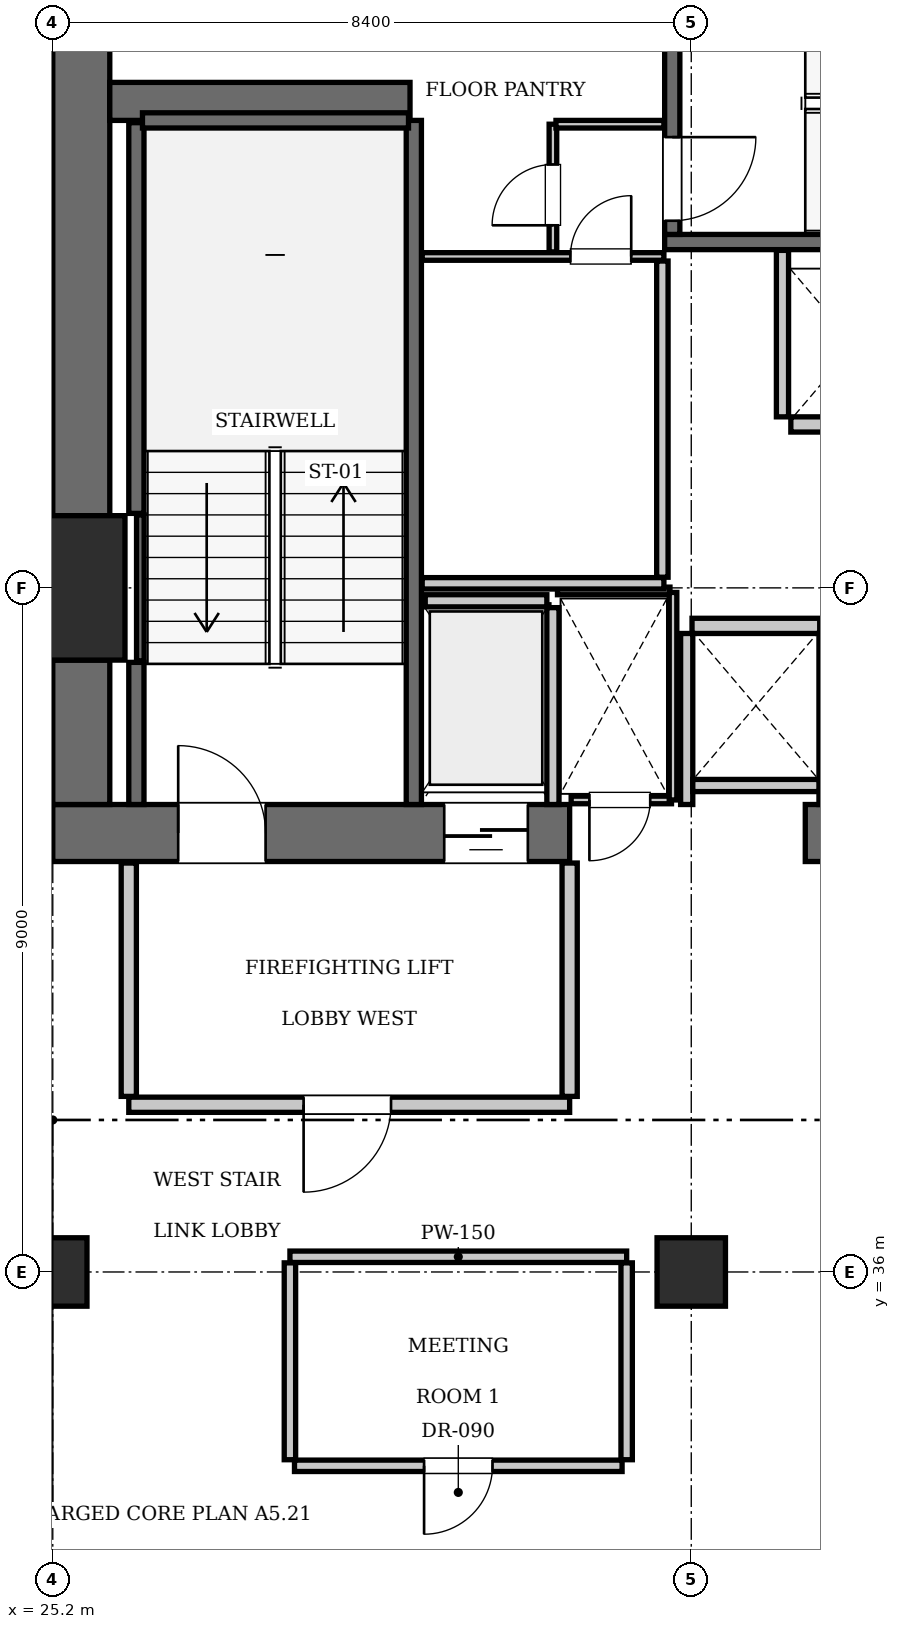
"""IFC4 building model, lengths in metres.
Left out: names, types, materials, properties, quantities, classifications, styles, units other than length and angle.
Written with IfcOpenShell. Run it as: python <this file> out.ifc"""

import sys

from ifc_helpers import new_model, si_unit, direction, frame, frame_2d, origin, origin_2d, place, context, subcontext, project, spatial, rectangle, extrude, element, fill, save


model = new_model("IFC4")
c1 = context("Model", 3, precision=1e-05, world=origin(), true_north=direction((0.0, 1.0)))
c2 = subcontext(c1, "Body", "Model", "MODEL_VIEW")
j1 = project(units=[si_unit("LENGTHUNIT", "METRE"), si_unit("PLANEANGLEUNIT", "RADIAN")], contexts=[c1])
p1 = place(None, origin())
s1 = spatial("IfcSite", under=j1, at=p1, CompositionType="ELEMENT")
p2 = place(p1, origin())
s2 = spatial("IfcBuilding", under=s1, at=p2, CompositionType="ELEMENT")
p3 = place(p2, frame((0.0, 0.0, 177.45)))
s3 = spatial("IfcBuildingStorey", under=s2, at=p3, CompositionType="ELEMENT", Elevation=177.45)
p4 = place(p3, frame((25.2, 45.0, 0.0), z_axis=(0.0, 0.0, 1.0), x_axis=(1.0, 0.0, 0.0)))
e1 = element("IfcColumn", 1, at=p4, inside=s3, PredefinedType="COLUMN", context=c2, shape_type="SweptSolid", body=[
    extrude(rectangle(XDim=1.9, YDim=1.9, at=origin_2d()), origin(), (0.0, 0.0, 1.0), 3.85),
])
p5 = place(p3, frame((25.2, 41.775, 0.0), z_axis=(0.0, 0.0, 1.0), x_axis=(1.0, 0.0, 0.0)))
e2 = element("IfcWall", 2, at=p5, inside=s3, PredefinedType="SHEAR", context=c2, shape_type="SweptSolid", body=[
    extrude(rectangle(XDim=6.8, YDim=0.75, at=frame_2d((3.4, 0.0))), origin(), (0.0, 0.0, 1.0), 3.85),
])
p6 = place(p5, frame((1.65, 0.0, 0.0)))
e3 = element("IfcOpeningElement", 3, at=p6, cuts=e2, PredefinedType="OPENING", context=c2, shape_type="SweptSolid", body=[
    extrude(rectangle(XDim=1.15, YDim=2.15, at=frame_2d((0.575, 1.075))), frame((0.0, 0.385, 0.0), z_axis=(0.0, -1.0, 0.0), x_axis=(1.0, 0.0, 0.0)), (0.0, 0.0, 1.0), 0.77),
])
p7 = place(p5, frame((5.15, 0.0, 0.0)))
e4 = element("IfcOpeningElement", 4, at=p7, cuts=e2, PredefinedType="OPENING", context=c2, shape_type="SweptSolid", body=[
    extrude(rectangle(XDim=1.1, YDim=2.2, at=frame_2d((0.55, 1.1))), frame((0.0, 0.385, 0.0), z_axis=(0.0, -1.0, 0.0), x_axis=(1.0, 0.0, 0.0)), (0.0, 0.0, 1.0), 0.77),
])
p8 = place(p3, frame((35.1, 41.775, 0.0), z_axis=(0.0, 0.0, 1.0), x_axis=(1.0, 0.0, 0.0)))
e5 = element("IfcWall", 5, at=p8, inside=s3, PredefinedType="SHEAR", context=c2, shape_type="SweptSolid", body=[
    extrude(rectangle(XDim=5.4, YDim=0.75, at=frame_2d((2.7, 0.0))), origin(), (0.0, 0.0, 1.0), 3.85),
])
p9 = place(p3, frame((25.575, 42.15, 0.0), z_axis=(0.0, 0.0, 1.0), x_axis=(0.0, 1.0, 0.0)))
e6 = element("IfcWall", 6, at=p9, inside=s3, PredefinedType="SHEAR", context=c2, shape_type="SweptSolid", body=[
    extrude(rectangle(XDim=1.9, YDim=0.75, at=frame_2d((0.95, 0.0))), origin(), (0.0, 0.0, 1.0), 3.85),
])
p10 = place(p3, frame((25.575, 45.95, 0.0), z_axis=(0.0, 0.0, 1.0), x_axis=(0.0, 1.0, 0.0)))
e7 = element("IfcWall", 7, at=p10, inside=s3, PredefinedType="SHEAR", context=c2, shape_type="SweptSolid", body=[
    extrude(rectangle(XDim=7.3, YDim=0.75, at=frame_2d((3.65, 0.0))), origin(), (0.0, 0.0, 1.0), 3.85),
])
p11 = place(p3, frame((25.95, 51.4, 0.0), z_axis=(0.0, 0.0, 1.0), x_axis=(1.0, 0.0, 0.0)))
e8 = element("IfcWall", 8, at=p11, inside=s3, PredefinedType="SHEAR", context=c2, shape_type="SweptSolid", body=[
    extrude(rectangle(XDim=3.95, YDim=0.5, at=frame_2d((1.975, 0.0))), origin(), (0.0, 0.0, 1.0), 3.85),
])
for number, where, z_axis, x_axis in (
    (9, (25.2, 36.0, 0.0), (0.0, 0.0, 1.0), (1.0, 0.0, 0.0)),
    (10, (33.6, 36.0, 0.0), (0.0, 0.0, 1.0), (1.0, 0.0, 0.0)),
):
    element("IfcColumn", number, at=place(p3, frame(where, z_axis=z_axis, x_axis=x_axis)), inside=s3, PredefinedType="COLUMN", context=c2, shape_type="SweptSolid", body=[
        extrude(rectangle(XDim=0.9, YDim=0.9, at=origin_2d()), origin(), (0.0, 0.0, 1.0), 3.85),
    ])
p12 = place(p3, frame((29.95, 42.15, 0.0), z_axis=(0.0, 0.0, 1.0), x_axis=(0.0, 1.0, 0.0)))
e11 = element("IfcWall", 11, at=p12, inside=s3, PredefinedType="SOLIDWALL", context=c2, shape_type="SweptSolid", body=[
    extrude(rectangle(XDim=9.0, YDim=0.2, at=frame_2d((4.5, 0.0))), origin(), (0.0, 0.0, 1.0), 3.61),
])
p13 = place(p3, frame((26.3, 42.15, 0.0), z_axis=(0.0, 0.0, 1.0), x_axis=(0.0, 1.0, 0.0)))
e12 = element("IfcWall", 12, at=p13, inside=s3, PredefinedType="SOLIDWALL", context=c2, shape_type="SweptSolid", body=[
    extrude(rectangle(XDim=1.87, YDim=0.2, at=frame_2d((0.935, 0.0))), origin(), (0.0, 0.0, 1.0), 3.61),
])
p14 = place(p3, frame((26.3, 45.98, 0.0), z_axis=(0.0, 0.0, 1.0), x_axis=(0.0, 1.0, 0.0)))
e13 = element("IfcWall", 13, at=p14, inside=s3, PredefinedType="SOLIDWALL", context=c2, shape_type="SweptSolid", body=[
    extrude(rectangle(XDim=5.14, YDim=0.2, at=frame_2d((2.57, 0.0))), origin(), (0.0, 0.0, 1.0), 3.61),
])
p15 = place(p3, frame((26.38, 51.15, 0.0), z_axis=(0.0, 0.0, 1.0), x_axis=(1.0, 0.0, 0.0)))
e14 = element("IfcWall", 14, at=p15, inside=s3, PredefinedType="SOLIDWALL", context=c2, shape_type="SweptSolid", body=[
    extrude(rectangle(XDim=3.5, YDim=0.2, at=frame_2d((1.75, 0.0))), origin(), (0.0, 0.0, 1.0), 3.61),
])
p16 = place(p3, frame((26.352, 44.04, 0.0), z_axis=(0.0, 0.0, 1.0), x_axis=(0.0, 1.0, 0.0)))
e15 = element("IfcWall", 15, at=p16, inside=s3, PredefinedType="SOLIDWALL", context=c2, shape_type="SweptSolid", body=[
    extrude(rectangle(XDim=1.92, YDim=0.1, at=frame_2d((0.96, 0.0))), origin(), (0.0, 0.0, 1.0), 3.61),
])
p17 = place(p3, frame((33.25, 49.55, 0.0), z_axis=(0.0, 0.0, 1.0), x_axis=(1.0, 0.0, 0.0)))
e16 = element("IfcWall", 16, at=p17, inside=s3, PredefinedType="SOLIDWALL", context=c2, shape_type="SweptSolid", body=[
    extrude(rectangle(XDim=9.1, YDim=0.2, at=frame_2d((4.55, 0.0))), origin(), (0.0, 0.0, 1.0), 3.61),
])
p18 = place(p3, frame((33.35, 49.65, 0.0), z_axis=(0.0, 0.0, 1.0), x_axis=(0.0, 1.0, 0.0)))
e17 = element("IfcWall", 17, at=p18, inside=s3, PredefinedType="SOLIDWALL", context=c2, shape_type="SweptSolid", body=[
    extrude(rectangle(XDim=3.6, YDim=0.2, at=frame_2d((1.8, 0.0))), origin(), (0.0, 0.0, 1.0), 3.61),
])
p19 = place(p18, frame((0.18, 0.0, 0.0)))
e18 = element("IfcOpeningElement", 18, at=p19, cuts=e17, PredefinedType="OPENING", context=c2, shape_type="SweptSolid", body=[
    extrude(rectangle(XDim=1.1, YDim=2.15, at=frame_2d((0.55, 1.075))), frame((0.0, 0.11, 0.0), z_axis=(0.0, -1.0, 0.0), x_axis=(1.0, 0.0, 0.0)), (0.0, 0.0, 1.0), 0.22),
])
p20 = place(p3, frame((34.91, 47.15, 0.0), z_axis=(0.0, 0.0, 1.0), x_axis=(1.0, 0.0, 0.0)))
e19 = element("IfcWall", 19, at=p20, inside=s3, PredefinedType="SOLIDWALL", context=c2, shape_type="SweptSolid", body=[
    extrude(rectangle(XDim=1.68, YDim=0.2, at=frame_2d((0.84, 0.0))), origin(), (0.0, 0.0, 1.0), 3.61),
])
p21 = place(p3, frame((33.61, 44.5, 0.0), z_axis=(0.0, 0.0, 1.0), x_axis=(1.0, 0.0, 0.0)))
e20 = element("IfcWall", 20, at=p21, inside=s3, PredefinedType="SOLIDWALL", context=c2, shape_type="SweptSolid", body=[
    extrude(rectangle(XDim=1.68, YDim=0.2, at=frame_2d((0.84, 0.0))), origin(), (0.0, 0.0, 1.0), 3.61),
])
p22 = place(p3, frame((30.1, 44.83, 0.0), z_axis=(0.0, 0.0, 1.0), x_axis=(1.0, 0.0, 0.0)))
e21 = element("IfcWall", 21, at=p22, inside=s3, PredefinedType="SOLIDWALL", context=c2, shape_type="SweptSolid", body=[
    extrude(rectangle(XDim=1.6, YDim=0.16, at=frame_2d((0.8, 0.0))), origin(), (0.0, 0.0, 1.0), 3.61),
])
p23 = place(p3, frame((31.78, 42.15, 0.0), z_axis=(0.0, 0.0, 1.0), x_axis=(0.0, 1.0, 0.0)))
e22 = element("IfcWall", 22, at=p23, inside=s3, PredefinedType="SOLIDWALL", context=c2, shape_type="SweptSolid", body=[
    extrude(rectangle(XDim=2.59, YDim=0.16, at=frame_2d((1.295, 0.0))), origin(), (0.0, 0.0, 1.0), 3.61),
])
p24 = place(p3, frame((34.8, 47.25, 0.0), z_axis=(0.0, 0.0, 1.0), x_axis=(0.0, 1.0, 0.0)))
e23 = element("IfcWall", 23, at=p24, inside=s3, PredefinedType="SOLIDWALL", context=c2, shape_type="SweptSolid", body=[
    extrude(rectangle(XDim=2.19, YDim=0.16, at=frame_2d((1.095, 0.0))), origin(), (0.0, 0.0, 1.0), 3.61),
])
for number, where, z_axis, x_axis in (
    (24, (33.54, 42.15, 0.0), (0.0, 0.0, 1.0), (0.0, 1.0, 0.0)),
    (25, (35.36, 42.15, 0.0), (0.0, 0.0, 1.0), (0.0, 1.0, 0.0)),
):
    element("IfcWall", number, at=place(p3, frame(where, z_axis=z_axis, x_axis=x_axis)), inside=s3, PredefinedType="SOLIDWALL", context=c2, shape_type="SweptSolid", body=[
        extrude(rectangle(XDim=2.25, YDim=0.16, at=frame_2d((1.125, 0.0))), origin(), (0.0, 0.0, 1.0), 3.61),
    ])
p25 = place(p3, frame((33.62, 42.4, 0.0), z_axis=(0.0, 0.0, 1.0), x_axis=(1.0, 0.0, 0.0)))
e26 = element("IfcWall", 26, at=p25, inside=s3, PredefinedType="SOLIDWALL", context=c2, shape_type="SweptSolid", body=[
    extrude(rectangle(XDim=1.66, YDim=0.16, at=frame_2d((0.83, 0.0))), origin(), (0.0, 0.0, 1.0), 3.61),
])
p26 = place(p3, frame((26.2, 38.2, 0.0), z_axis=(0.0, 0.0, 1.0), x_axis=(1.0, 0.0, 0.0)))
e27 = element("IfcWall", 27, at=p26, inside=s3, PredefinedType="PARTITIONING", context=c2, shape_type="SweptSolid", body=[
    extrude(rectangle(XDim=5.8, YDim=0.2, at=frame_2d((2.9, 0.0))), origin(), (0.0, 0.0, 1.0), 3.61),
])
p27 = place(p26, frame((2.3, 0.0, 0.0)))
e28 = element("IfcOpeningElement", 28, at=p27, cuts=e27, PredefinedType="OPENING", context=c2, shape_type="SweptSolid", body=[
    extrude(rectangle(XDim=1.15, YDim=2.15, at=frame_2d((0.575, 1.075))), frame((0.0, 0.11, 0.0), z_axis=(0.0, -1.0, 0.0), x_axis=(1.0, 0.0, 0.0)), (0.0, 0.0, 1.0), 0.22),
])
for number, where, z_axis, x_axis in (
    (29, (26.2, 38.31, 0.0), (0.0, 0.0, 1.0), (0.0, 1.0, 0.0)),
    (30, (32.0, 38.31, 0.0), (0.0, 0.0, 1.0), (0.0, 1.0, 0.0)),
):
    element("IfcWall", number, at=place(p3, frame(where, z_axis=z_axis, x_axis=x_axis)), inside=s3, PredefinedType="PARTITIONING", context=c2, shape_type="SweptSolid", body=[
        extrude(rectangle(XDim=3.07, YDim=0.2, at=frame_2d((1.535, 0.0))), origin(), (0.0, 0.0, 1.0), 3.61),
    ])
p28 = place(p3, frame((32.02, 42.21, 0.0), z_axis=(0.0, 0.0, 1.0), x_axis=(1.0, 0.0, 0.0)))
e31 = element("IfcWall", 31, at=p28, inside=s3, PredefinedType="PARTITIONING", context=c2, shape_type="SweptSolid", body=[
    extrude(rectangle(XDim=1.32, YDim=0.1, at=frame_2d((0.66, 0.0))), origin(), (0.0, 0.0, 1.0), 3.61),
])
p29 = place(p28, frame((0.24, 0.0, 0.0)))
e32 = element("IfcOpeningElement", 32, at=p29, cuts=e31, PredefinedType="OPENING", context=c2, shape_type="SweptSolid", body=[
    extrude(rectangle(XDim=0.8, YDim=2.05, at=frame_2d((0.4, 1.025))), frame((0.0, 0.06, 0.0), z_axis=(0.0, -1.0, 0.0), x_axis=(1.0, 0.0, 0.0)), (0.0, 0.0, 1.0), 0.12),
])
p30 = place(p3, frame((31.84, 44.96, 0.0), z_axis=(0.0, 0.0, 1.0), x_axis=(1.0, 0.0, 0.0)))
e33 = element("IfcWall", 33, at=p30, inside=s3, PredefinedType="PARTITIONING", context=c2, shape_type="SweptSolid", body=[
    extrude(rectangle(XDim=1.48, YDim=0.1, at=frame_2d((0.74, 0.0))), origin(), (0.0, 0.0, 1.0), 3.61),
])
p31 = place(p3, frame((33.36, 42.21, 0.0), z_axis=(0.0, 0.0, 1.0), x_axis=(0.0, 1.0, 0.0)))
e34 = element("IfcWall", 34, at=p31, inside=s3, PredefinedType="PARTITIONING", context=c2, shape_type="SweptSolid", body=[
    extrude(rectangle(XDim=2.73, YDim=0.1, at=frame_2d((1.365, 0.0))), origin(), (0.0, 0.0, 1.0), 3.61),
])
p32 = place(p3, frame((30.06, 45.06, 0.0), z_axis=(0.0, 0.0, 1.0), x_axis=(1.0, 0.0, 0.0)))
e35 = element("IfcWall", 35, at=p32, inside=s3, PredefinedType="PARTITIONING", context=c2, shape_type="SweptSolid", body=[
    extrude(rectangle(XDim=3.18, YDim=0.15, at=frame_2d((1.59, 0.0))), origin(), (0.0, 0.0, 1.0), 3.61),
])
p33 = place(p3, frame((33.22, 45.14, 0.0), z_axis=(0.0, 0.0, 1.0), x_axis=(0.0, 1.0, 0.0)))
e36 = element("IfcWall", 36, at=p33, inside=s3, PredefinedType="PARTITIONING", context=c2, shape_type="SweptSolid", body=[
    extrude(rectangle(XDim=4.16, YDim=0.15, at=frame_2d((2.08, 0.0))), origin(), (0.0, 0.0, 1.0), 3.61),
])
p34 = place(p3, frame((30.06, 49.36, 0.0), z_axis=(0.0, 0.0, 1.0), x_axis=(1.0, 0.0, 0.0)))
e37 = element("IfcWall", 37, at=p34, inside=s3, PredefinedType="PARTITIONING", context=c2, shape_type="SweptSolid", body=[
    extrude(rectangle(XDim=3.18, YDim=0.1, at=frame_2d((1.59, 0.0))), origin(), (0.0, 0.0, 1.0), 3.61),
])
p35 = place(p34, frame((1.95, 0.0, 0.0)))
e38 = element("IfcOpeningElement", 38, at=p35, cuts=e37, PredefinedType="OPENING", context=c2, shape_type="SweptSolid", body=[
    extrude(rectangle(XDim=0.8, YDim=2.05, at=frame_2d((0.4, 1.025))), frame((0.0, 0.06, 0.0), z_axis=(0.0, -1.0, 0.0), x_axis=(1.0, 0.0, 0.0)), (0.0, 0.0, 1.0), 0.12),
])
p36 = place(p3, frame((31.78, 49.42, 0.0), z_axis=(0.0, 0.0, 1.0), x_axis=(0.0, 1.0, 0.0)))
e39 = element("IfcWall", 39, at=p36, inside=s3, PredefinedType="PARTITIONING", context=c2, shape_type="SweptSolid", body=[
    extrude(rectangle(XDim=1.68, YDim=0.1, at=frame_2d((0.84, 0.0))), origin(), (0.0, 0.0, 1.0), 3.61),
])
p37 = place(p36, frame((0.35, 0.0, 0.0)))
e40 = element("IfcOpeningElement", 40, at=p37, cuts=e39, PredefinedType="OPENING", context=c2, shape_type="SweptSolid", body=[
    extrude(rectangle(XDim=0.8, YDim=2.05, at=frame_2d((0.4, 1.025))), frame((0.0, 0.06, 0.0), z_axis=(0.0, -1.0, 0.0), x_axis=(1.0, 0.0, 0.0)), (0.0, 0.0, 1.0), 0.12),
])
p38 = place(p3, frame((31.82, 51.1, 0.0), z_axis=(0.0, 0.0, 1.0), x_axis=(1.0, 0.0, 0.0)))
e41 = element("IfcWall", 41, at=p38, inside=s3, PredefinedType="PARTITIONING", context=c2, shape_type="SweptSolid", body=[
    extrude(rectangle(XDim=1.42, YDim=0.1, at=frame_2d((0.71, 0.0))), origin(), (0.0, 0.0, 1.0), 3.61),
])
p39 = place(p3, frame((28.32, 36.2, 0.0), z_axis=(0.0, 0.0, 1.0), x_axis=(1.0, 0.0, 0.0)))
e42 = element("IfcWall", 42, at=p39, inside=s3, PredefinedType="PARTITIONING", context=c2, shape_type="SweptSolid", body=[
    extrude(rectangle(XDim=4.43, YDim=0.15, at=frame_2d((2.215, 0.0))), origin(), (0.0, 0.0, 1.0), 3.61),
])
for number, where, z_axis, x_axis in (
    (43, (28.32, 33.53, 0.0), (0.0, 0.0, 1.0), (0.0, 1.0, 0.0)),
    (44, (32.75, 33.53, 0.0), (0.0, 0.0, 1.0), (0.0, 1.0, 0.0)),
):
    element("IfcWall", number, at=place(p3, frame(where, z_axis=z_axis, x_axis=x_axis)), inside=s3, PredefinedType="PARTITIONING", context=c2, shape_type="SweptSolid", body=[
        extrude(rectangle(XDim=2.59, YDim=0.15, at=frame_2d((1.295, 0.0))), origin(), (0.0, 0.0, 1.0), 3.61),
    ])
p40 = place(p3, frame((28.38, 33.45, 0.0), z_axis=(0.0, 0.0, 1.0), x_axis=(1.0, 0.0, 0.0)))
e45 = element("IfcWall", 45, at=p40, inside=s3, PredefinedType="PARTITIONING", context=c2, shape_type="SweptSolid", body=[
    extrude(rectangle(XDim=4.31, YDim=0.15, at=frame_2d((2.155, 0.0))), origin(), (0.0, 0.0, 1.0), 3.61),
])
p41 = place(p40, frame((1.705, 0.0, 0.0)))
e46 = element("IfcOpeningElement", 46, at=p41, cuts=e45, PredefinedType="OPENING", context=c2, shape_type="SweptSolid", body=[
    extrude(rectangle(XDim=0.9, YDim=2.1, at=frame_2d((0.45, 1.05))), frame((0.0, 0.085, 0.0), z_axis=(0.0, -1.0, 0.0), x_axis=(1.0, 0.0, 0.0)), (0.0, 0.0, 1.0), 0.17),
])
p42 = place(p6, origin())
e47 = element("IfcDoor", 47, at=p42, inside=s3, OperationType="SINGLE_SWING_LEFT", PredefinedType="DOOR", context=c2, shape_type="SweptSolid", body=[
    extrude(rectangle(XDim=1.15, YDim=2.15, at=frame_2d((0.575, 1.075))), frame((0.0, 0.025, 0.0), z_axis=(0.0, -1.0, 0.0), x_axis=(1.0, 0.0, 0.0)), (0.0, 0.0, 1.0), 0.05),
])
fill(e3, e47)
p43 = place(p19, frame((1.1, 0.0, 0.0), z_axis=(0.0, 0.0, 1.0), x_axis=(-1.0, 0.0, 0.0)))
e48 = element("IfcDoor", 48, at=p43, inside=s3, OperationType="SINGLE_SWING_LEFT", PredefinedType="DOOR", context=c2, shape_type="SweptSolid", body=[
    extrude(rectangle(XDim=1.1, YDim=2.15, at=frame_2d((0.55, 1.075))), frame((0.0, 0.025, 0.0), z_axis=(0.0, -1.0, 0.0), x_axis=(1.0, 0.0, 0.0)), (0.0, 0.0, 1.0), 0.05),
])
fill(e18, e48)
p44 = place(p7, frame((1.1, 0.0, 0.0), z_axis=(0.0, 0.0, 1.0), x_axis=(-1.0, 0.0, 0.0)))
e49 = element("IfcDoor", 49, at=p44, inside=s3, OperationType="SLIDING_TO_LEFT", PredefinedType="DOOR", context=c2, shape_type="SweptSolid", body=[
    extrude(rectangle(XDim=1.1, YDim=2.2, at=frame_2d((0.55, 1.1))), frame((0.0, 0.025, 0.0), z_axis=(0.0, -1.0, 0.0), x_axis=(1.0, 0.0, 0.0)), (0.0, 0.0, 1.0), 0.05),
])
fill(e4, e49)
p45 = place(p27, frame((1.15, 0.0, 0.0), z_axis=(0.0, 0.0, 1.0), x_axis=(-1.0, 0.0, 0.0)))
e50 = element("IfcDoor", 50, at=p45, inside=s3, OperationType="SINGLE_SWING_RIGHT", PredefinedType="DOOR", context=c2, shape_type="SweptSolid", body=[
    extrude(rectangle(XDim=1.15, YDim=2.15, at=frame_2d((0.575, 1.075))), frame((0.0, 0.025, 0.0), z_axis=(0.0, -1.0, 0.0), x_axis=(1.0, 0.0, 0.0)), (0.0, 0.0, 1.0), 0.05),
])
fill(e28, e50)
p46 = place(p29, frame((0.8, 0.0, 0.0), z_axis=(0.0, 0.0, 1.0), x_axis=(-1.0, 0.0, 0.0)))
e51 = element("IfcDoor", 51, at=p46, inside=s3, OperationType="SINGLE_SWING_RIGHT", PredefinedType="DOOR", context=c2, shape_type="SweptSolid", body=[
    extrude(rectangle(XDim=0.8, YDim=2.05, at=frame_2d((0.4, 1.025))), frame((0.0, 0.025, 0.0), z_axis=(0.0, -1.0, 0.0), x_axis=(1.0, 0.0, 0.0)), (0.0, 0.0, 1.0), 0.05),
])
fill(e32, e51)
p47 = place(p35, origin())
e52 = element("IfcDoor", 52, at=p47, inside=s3, OperationType="SINGLE_SWING_RIGHT", PredefinedType="DOOR", context=c2, shape_type="SweptSolid", body=[
    extrude(rectangle(XDim=0.8, YDim=2.05, at=frame_2d((0.4, 1.025))), frame((0.0, 0.025, 0.0), z_axis=(0.0, -1.0, 0.0), x_axis=(1.0, 0.0, 0.0)), (0.0, 0.0, 1.0), 0.05),
])
fill(e38, e52)
p48 = place(p37, origin())
e53 = element("IfcDoor", 53, at=p48, inside=s3, OperationType="SINGLE_SWING_LEFT", PredefinedType="DOOR", context=c2, shape_type="SweptSolid", body=[
    extrude(rectangle(XDim=0.8, YDim=2.05, at=frame_2d((0.4, 1.025))), frame((0.0, 0.025, 0.0), z_axis=(0.0, -1.0, 0.0), x_axis=(1.0, 0.0, 0.0)), (0.0, 0.0, 1.0), 0.05),
])
fill(e40, e53)
p49 = place(p41, frame((0.9, 0.0, 0.0), z_axis=(0.0, 0.0, 1.0), x_axis=(-1.0, 0.0, 0.0)))
e54 = element("IfcDoor", 54, at=p49, inside=s3, OperationType="SINGLE_SWING_RIGHT", PredefinedType="DOOR", context=c2, shape_type="SweptSolid", body=[
    extrude(rectangle(XDim=0.9, YDim=2.1, at=frame_2d((0.45, 1.05))), frame((0.0, 0.025, 0.0), z_axis=(0.0, -1.0, 0.0), x_axis=(1.0, 0.0, 0.0)), (0.0, 0.0, 1.0), 0.05),
])
fill(e46, e54)
save(model, sys.argv[1])
